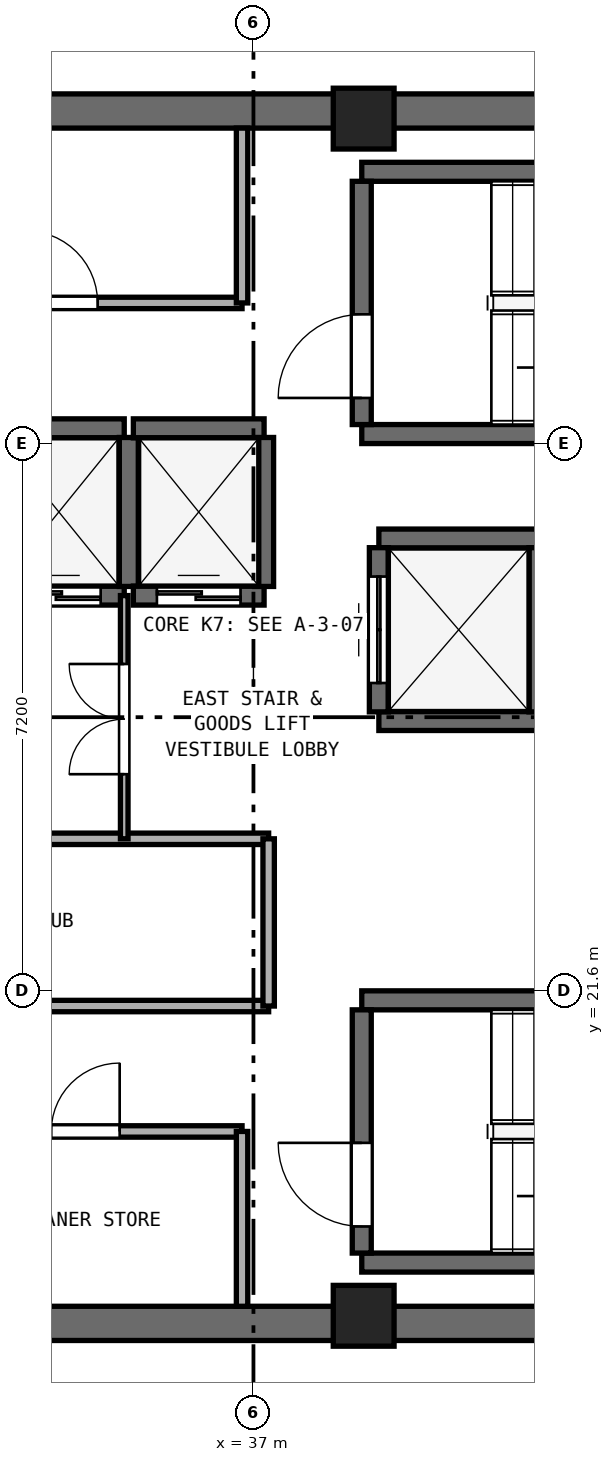
"""IFC4 building model, lengths in metres.
Left out: names, types, materials, properties, quantities, classifications, styles, units other than length and angle.
Written with IfcOpenShell. Run it as: python <this file> out.ifc"""

import sys

from ifc_helpers import new_model, si_unit, direction, frame, frame_2d, origin, origin_2d, place, context, subcontext, project, spatial, rectangle, extrude, element, fill, save


model = new_model("IFC4")
c1 = context("Model", 3, precision=1e-05, world=origin(), true_north=direction((0.0, 1.0)))
c2 = subcontext(c1, "Body", "Model", "MODEL_VIEW")
j1 = project(units=[si_unit("LENGTHUNIT", "METRE"), si_unit("PLANEANGLEUNIT", "RADIAN")], contexts=[c1])
p1 = place(None, origin())
s1 = spatial("IfcSite", under=j1, at=p1, CompositionType="ELEMENT")
p2 = place(p1, origin())
s2 = spatial("IfcBuilding", under=s1, at=p2, CompositionType="ELEMENT")
p3 = place(p2, frame((0.0, 0.0, 255.4)))
s3 = spatial("IfcBuildingStorey", under=s2, at=p3, CompositionType="ELEMENT", Elevation=255.4)
for number, where, z_axis, x_axis in (
    (1, (25.4, 17.225, 0.0), (0.0, 0.0, 1.0), (1.0, 0.0, 0.0)),
    (2, (25.4, 33.175, 0.0), (0.0, 0.0, 1.0), (1.0, 0.0, 0.0)),
):
    element("IfcWall", number, at=place(p3, frame(where, z_axis=z_axis, x_axis=x_axis)), inside=s3, PredefinedType="SHEAR", context=c2, shape_type="SweptSolid", body=[
        extrude(rectangle(XDim=23.2, YDim=0.45, at=frame_2d((11.6, 0.0))), origin(), (0.0, 0.0, 1.0), 3.51),
    ])
for number, where, z_axis, x_axis in (
    (3, (38.45, 17.325, 0.0), (0.0, 0.0, 1.0), (1.0, 0.0, 0.0)),
    (4, (38.45, 33.075, 0.0), (0.0, 0.0, 1.0), (1.0, 0.0, 0.0)),
):
    element("IfcColumn", number, at=place(p3, frame(where, z_axis=z_axis, x_axis=x_axis)), inside=s3, PredefinedType="PILASTER", context=c2, shape_type="SweptSolid", body=[
        extrude(rectangle(XDim=0.8, YDim=0.8, at=origin_2d()), origin(), (0.0, 0.0, 1.0), 3.8),
    ])
for number, where, z_axis, x_axis in (
    (5, (38.425, 28.925, 0.0), (0.0, 0.0, 1.0), (1.0, 0.0, 0.0)),
    (6, (38.425, 32.375, 0.0), (0.0, 0.0, 1.0), (1.0, 0.0, 0.0)),
):
    element("IfcWall", number, at=place(p3, frame(where, z_axis=z_axis, x_axis=x_axis)), inside=s3, PredefinedType="SHEAR", context=c2, shape_type="SweptSolid", body=[
        extrude(rectangle(XDim=7.3, YDim=0.25, at=frame_2d((3.65, 0.0))), origin(), (0.0, 0.0, 1.0), 3.51),
    ])
p4 = place(p3, frame((38.425, 29.05, 0.0), z_axis=(0.0, 0.0, 1.0), x_axis=(0.0, 1.0, 0.0)))
e7 = element("IfcWall", 7, at=p4, inside=s3, PredefinedType="SHEAR", context=c2, shape_type="SweptSolid", body=[
    extrude(rectangle(XDim=3.2, YDim=0.25, at=frame_2d((1.6, 0.0))), origin(), (0.0, 0.0, 1.0), 3.51),
])
p5 = place(p4, frame((0.35, 0.0, 0.0)))
e8 = element("IfcOpeningElement", 8, at=p5, cuts=e7, PredefinedType="OPENING", context=c2, shape_type="SweptSolid", body=[
    extrude(rectangle(XDim=1.1, YDim=2.15, at=frame_2d((0.55, 1.075))), frame((0.0, 0.135, 0.0), z_axis=(0.0, -1.0, 0.0), x_axis=(1.0, 0.0, 0.0)), (0.0, 0.0, 1.0), 0.27),
])
for number, where, z_axis, x_axis in (
    (9, (38.425, 18.025, 0.0), (0.0, 0.0, 1.0), (1.0, 0.0, 0.0)),
    (10, (38.425, 21.475, 0.0), (0.0, 0.0, 1.0), (1.0, 0.0, 0.0)),
):
    element("IfcWall", number, at=place(p3, frame(where, z_axis=z_axis, x_axis=x_axis)), inside=s3, PredefinedType="SHEAR", context=c2, shape_type="SweptSolid", body=[
        extrude(rectangle(XDim=7.3, YDim=0.25, at=frame_2d((3.65, 0.0))), origin(), (0.0, 0.0, 1.0), 3.51),
    ])
p6 = place(p3, frame((38.425, 18.15, 0.0), z_axis=(0.0, 0.0, 1.0), x_axis=(0.0, 1.0, 0.0)))
e11 = element("IfcWall", 11, at=p6, inside=s3, PredefinedType="SHEAR", context=c2, shape_type="SweptSolid", body=[
    extrude(rectangle(XDim=3.2, YDim=0.25, at=frame_2d((1.6, 0.0))), origin(), (0.0, 0.0, 1.0), 3.51),
])
p7 = place(p6, frame((0.35, 0.0, 0.0)))
e12 = element("IfcOpeningElement", 12, at=p7, cuts=e11, PredefinedType="OPENING", context=c2, shape_type="SweptSolid", body=[
    extrude(rectangle(XDim=1.1, YDim=2.15, at=frame_2d((0.55, 1.075))), frame((0.0, 0.135, 0.0), z_axis=(0.0, -1.0, 0.0), x_axis=(1.0, 0.0, 0.0)), (0.0, 0.0, 1.0), 0.27),
])
p8 = place(p3, frame((33.58, 26.8, 0.0), z_axis=(0.0, 0.0, 1.0), x_axis=(1.0, 0.0, 0.0)))
e13 = element("IfcWall", 13, at=p8, inside=s3, PredefinedType="SHEAR", context=c2, shape_type="SweptSolid", body=[
    extrude(rectangle(XDim=1.72, YDim=0.25, at=frame_2d((0.86, 0.0))), origin(), (0.0, 0.0, 1.0), 3.51),
])
p9 = place(p8, frame((0.31, 0.0, 0.0)))
e14 = element("IfcOpeningElement", 14, at=p9, cuts=e13, PredefinedType="OPENING", context=c2, shape_type="SweptSolid", body=[
    extrude(rectangle(XDim=1.1, YDim=2.15, at=frame_2d((0.55, 1.075))), frame((0.0, 0.135, 0.0), z_axis=(0.0, -1.0, 0.0), x_axis=(1.0, 0.0, 0.0)), (0.0, 0.0, 1.0), 0.27),
])
p10 = place(p3, frame((33.58, 29.0, 0.0), z_axis=(0.0, 0.0, 1.0), x_axis=(1.0, 0.0, 0.0)))
e15 = element("IfcWall", 15, at=p10, inside=s3, PredefinedType="SHEAR", context=c2, shape_type="SweptSolid", body=[
    extrude(rectangle(XDim=1.72, YDim=0.25, at=frame_2d((0.86, 0.0))), origin(), (0.0, 0.0, 1.0), 3.51),
])
p11 = place(p3, frame((35.36, 26.92, 0.0), z_axis=(0.0, 0.0, 1.0), x_axis=(0.0, 1.0, 0.0)))
e16 = element("IfcWall", 16, at=p11, inside=s3, PredefinedType="SHEAR", context=c2, shape_type="SweptSolid", body=[
    extrude(rectangle(XDim=1.96, YDim=0.25, at=frame_2d((0.98, 0.0))), origin(), (0.0, 0.0, 1.0), 3.51),
])
p12 = place(p3, frame((35.42, 26.8, 0.0), z_axis=(0.0, 0.0, 1.0), x_axis=(1.0, 0.0, 0.0)))
e17 = element("IfcWall", 17, at=p12, inside=s3, PredefinedType="SHEAR", context=c2, shape_type="SweptSolid", body=[
    extrude(rectangle(XDim=1.72, YDim=0.25, at=frame_2d((0.86, 0.0))), origin(), (0.0, 0.0, 1.0), 3.51),
])
p13 = place(p12, frame((0.31, 0.0, 0.0)))
e18 = element("IfcOpeningElement", 18, at=p13, cuts=e17, PredefinedType="OPENING", context=c2, shape_type="SweptSolid", body=[
    extrude(rectangle(XDim=1.1, YDim=2.15, at=frame_2d((0.55, 1.075))), frame((0.0, 0.135, 0.0), z_axis=(0.0, -1.0, 0.0), x_axis=(1.0, 0.0, 0.0)), (0.0, 0.0, 1.0), 0.27),
])
p14 = place(p3, frame((35.42, 29.0, 0.0), z_axis=(0.0, 0.0, 1.0), x_axis=(1.0, 0.0, 0.0)))
e19 = element("IfcWall", 19, at=p14, inside=s3, PredefinedType="SHEAR", context=c2, shape_type="SweptSolid", body=[
    extrude(rectangle(XDim=1.72, YDim=0.25, at=frame_2d((0.86, 0.0))), origin(), (0.0, 0.0, 1.0), 3.51),
])
p15 = place(p3, frame((37.14, 26.92, 0.0), z_axis=(0.0, 0.0, 1.0), x_axis=(0.0, 1.0, 0.0)))
e20 = element("IfcWall", 20, at=p15, inside=s3, PredefinedType="SHEAR", context=c2, shape_type="SweptSolid", body=[
    extrude(rectangle(XDim=1.96, YDim=0.25, at=frame_2d((0.98, 0.0))), origin(), (0.0, 0.0, 1.0), 3.51),
])
for number, where, z_axis, x_axis in (
    (21, (38.65, 25.15, 0.0), (0.0, 0.0, 1.0), (1.0, 0.0, 0.0)),
    (22, (38.65, 27.55, 0.0), (0.0, 0.0, 1.0), (1.0, 0.0, 0.0)),
):
    element("IfcWall", number, at=place(p3, frame(where, z_axis=z_axis, x_axis=x_axis)), inside=s3, PredefinedType="SHEAR", context=c2, shape_type="SweptSolid", body=[
        extrude(rectangle(XDim=2.1, YDim=0.25, at=frame_2d((1.05, 0.0))), origin(), (0.0, 0.0, 1.0), 3.51),
    ])
p16 = place(p3, frame((38.65, 25.27, 0.0), z_axis=(0.0, 0.0, 1.0), x_axis=(0.0, 1.0, 0.0)))
e23 = element("IfcWall", 23, at=p16, inside=s3, PredefinedType="SHEAR", context=c2, shape_type="SweptSolid", body=[
    extrude(rectangle(XDim=2.16, YDim=0.25, at=frame_2d((1.08, 0.0))), origin(), (0.0, 0.0, 1.0), 3.51),
])
p17 = place(p16, frame((0.38, 0.0, 0.0)))
e24 = element("IfcOpeningElement", 24, at=p17, cuts=e23, PredefinedType="OPENING", context=c2, shape_type="SweptSolid", body=[
    extrude(rectangle(XDim=1.4, YDim=2.2, at=frame_2d((0.7, 1.1))), frame((0.0, 0.135, 0.0), z_axis=(0.0, -1.0, 0.0), x_axis=(1.0, 0.0, 0.0)), (0.0, 0.0, 1.0), 0.27),
])
p18 = place(p3, frame((40.75, 25.27, 0.0), z_axis=(0.0, 0.0, 1.0), x_axis=(0.0, 1.0, 0.0)))
e25 = element("IfcWall", 25, at=p18, inside=s3, PredefinedType="SHEAR", context=c2, shape_type="SweptSolid", body=[
    extrude(rectangle(XDim=2.16, YDim=0.25, at=frame_2d((1.08, 0.0))), origin(), (0.0, 0.0, 1.0), 3.51),
])
p19 = place(p3, frame((32.1, 30.65, 0.0), z_axis=(0.0, 0.0, 1.0), x_axis=(1.0, 0.0, 0.0)))
e26 = element("IfcWall", 26, at=p19, inside=s3, PredefinedType="PARTITIONING", context=c2, shape_type="SweptSolid", body=[
    extrude(rectangle(XDim=4.75, YDim=0.15, at=frame_2d((2.375, 0.0))), origin(), (0.0, 0.0, 1.0), 3.51),
])
p20 = place(p19, frame((1.9, 0.0, 0.0)))
e27 = element("IfcOpeningElement", 27, at=p20, cuts=e26, PredefinedType="OPENING", context=c2, shape_type="SweptSolid", body=[
    extrude(rectangle(XDim=0.95, YDim=2.1, at=frame_2d((0.475, 1.05))), frame((0.0, 0.085, 0.0), z_axis=(0.0, -1.0, 0.0), x_axis=(1.0, 0.0, 0.0)), (0.0, 0.0, 1.0), 0.17),
])
p21 = place(p3, frame((36.85, 30.65, 0.0), z_axis=(0.0, 0.0, 1.0), x_axis=(0.0, 1.0, 0.0)))
e28 = element("IfcWall", 28, at=p21, inside=s3, PredefinedType="PARTITIONING", context=c2, shape_type="SweptSolid", body=[
    extrude(rectangle(XDim=2.3, YDim=0.15, at=frame_2d((1.15, 0.0))), origin(), (0.0, 0.0, 1.0), 3.51),
])
p22 = place(p3, frame((32.73, 19.75, 0.0), z_axis=(0.0, 0.0, 1.0), x_axis=(1.0, 0.0, 0.0)))
e29 = element("IfcWall", 29, at=p22, inside=s3, PredefinedType="PARTITIONING", context=c2, shape_type="SweptSolid", body=[
    extrude(rectangle(XDim=4.12, YDim=0.15, at=frame_2d((2.06, 0.0))), origin(), (0.0, 0.0, 1.0), 3.51),
])
p23 = place(p22, frame((1.61, 0.0, 0.0)))
e30 = element("IfcOpeningElement", 30, at=p23, cuts=e29, PredefinedType="OPENING", context=c2, shape_type="SweptSolid", body=[
    extrude(rectangle(XDim=0.9, YDim=2.1, at=frame_2d((0.45, 1.05))), frame((0.0, 0.085, 0.0), z_axis=(0.0, -1.0, 0.0), x_axis=(1.0, 0.0, 0.0)), (0.0, 0.0, 1.0), 0.17),
])
p24 = place(p3, frame((36.85, 17.45, 0.0), z_axis=(0.0, 0.0, 1.0), x_axis=(0.0, 1.0, 0.0)))
e31 = element("IfcWall", 31, at=p24, inside=s3, PredefinedType="PARTITIONING", context=c2, shape_type="SweptSolid", body=[
    extrude(rectangle(XDim=2.3, YDim=0.15, at=frame_2d((1.15, 0.0))), origin(), (0.0, 0.0, 1.0), 3.51),
])
p25 = place(p3, frame((30.08, 21.4, 0.0), z_axis=(0.0, 0.0, 1.0), x_axis=(1.0, 0.0, 0.0)))
e32 = element("IfcWall", 32, at=p25, inside=s3, PredefinedType="PARTITIONING", context=c2, shape_type="SweptSolid", body=[
    extrude(rectangle(XDim=7.12, YDim=0.15, at=frame_2d((3.56, 0.0))), origin(), (0.0, 0.0, 1.0), 3.51),
])
p26 = place(p3, frame((30.08, 23.6, 0.0), z_axis=(0.0, 0.0, 1.0), x_axis=(1.0, 0.0, 0.0)))
e33 = element("IfcWall", 33, at=p26, inside=s3, PredefinedType="PARTITIONING", context=c2, shape_type="SweptSolid", body=[
    extrude(rectangle(XDim=7.12, YDim=0.15, at=frame_2d((3.56, 0.0))), origin(), (0.0, 0.0, 1.0), 3.51),
])
p27 = place(p26, frame((3.11, 0.0, 0.0)))
e34 = element("IfcOpeningElement", 34, at=p27, cuts=e33, PredefinedType="OPENING", context=c2, shape_type="SweptSolid", body=[
    extrude(rectangle(XDim=0.9, YDim=2.1, at=frame_2d((0.45, 1.05))), frame((0.0, 0.085, 0.0), z_axis=(0.0, -1.0, 0.0), x_axis=(1.0, 0.0, 0.0)), (0.0, 0.0, 1.0), 0.17),
])
p28 = place(p3, frame((37.2, 21.4, 0.0), z_axis=(0.0, 0.0, 1.0), x_axis=(0.0, 1.0, 0.0)))
e35 = element("IfcWall", 35, at=p28, inside=s3, PredefinedType="PARTITIONING", context=c2, shape_type="SweptSolid", body=[
    extrude(rectangle(XDim=2.2, YDim=0.15, at=frame_2d((1.1, 0.0))), origin(), (0.0, 0.0, 1.0), 3.51),
])
p29 = place(p3, frame((35.3, 23.6, 0.0), z_axis=(0.0, 0.0, 1.0), x_axis=(0.0, 1.0, 0.0)))
e36 = element("IfcWall", 36, at=p29, inside=s3, PredefinedType="PARTITIONING", context=c2, shape_type="SweptSolid", body=[
    extrude(rectangle(XDim=3.2, YDim=0.1, at=frame_2d((1.6, 0.0))), origin(), (0.0, 0.0, 1.0), 3.51),
])
p30 = place(p29, frame((0.85, 0.0, 0.0)))
e37 = element("IfcOpeningElement", 37, at=p30, cuts=e36, PredefinedType="OPENING", context=c2, shape_type="SweptSolid", body=[
    extrude(rectangle(XDim=1.45, YDim=2.12, at=frame_2d((0.725, 1.06))), frame((0.0, 0.06, 0.0), z_axis=(0.0, -1.0, 0.0), x_axis=(1.0, 0.0, 0.0)), (0.0, 0.0, 1.0), 0.12),
])
p31 = place(p5, origin())
e38 = element("IfcDoor", 38, at=p31, inside=s3, OperationType="SINGLE_SWING_LEFT", PredefinedType="DOOR", context=c2, shape_type="SweptSolid", body=[
    extrude(rectangle(XDim=1.1, YDim=2.15, at=frame_2d((0.55, 1.075))), frame((0.0, 0.025, 0.0), z_axis=(0.0, -1.0, 0.0), x_axis=(1.0, 0.0, 0.0)), (0.0, 0.0, 1.0), 0.05),
])
fill(e8, e38)
p32 = place(p7, origin())
e39 = element("IfcDoor", 39, at=p32, inside=s3, OperationType="SINGLE_SWING_RIGHT", PredefinedType="DOOR", context=c2, shape_type="SweptSolid", body=[
    extrude(rectangle(XDim=1.1, YDim=2.15, at=frame_2d((0.55, 1.075))), frame((0.0, 0.025, 0.0), z_axis=(0.0, -1.0, 0.0), x_axis=(1.0, 0.0, 0.0)), (0.0, 0.0, 1.0), 0.05),
])
fill(e12, e39)
p33 = place(p9, origin())
e40 = element("IfcDoor", 40, at=p33, inside=s3, OperationType="DOUBLE_DOOR_SLIDING", PredefinedType="DOOR", context=c2, shape_type="SweptSolid", body=[
    extrude(rectangle(XDim=1.1, YDim=2.15, at=frame_2d((0.55, 1.075))), frame((0.0, 0.025, 0.0), z_axis=(0.0, -1.0, 0.0), x_axis=(1.0, 0.0, 0.0)), (0.0, 0.0, 1.0), 0.05),
])
fill(e14, e40)
p34 = place(p13, origin())
e41 = element("IfcDoor", 41, at=p34, inside=s3, OperationType="DOUBLE_DOOR_SLIDING", PredefinedType="DOOR", context=c2, shape_type="SweptSolid", body=[
    extrude(rectangle(XDim=1.1, YDim=2.15, at=frame_2d((0.55, 1.075))), frame((0.0, 0.025, 0.0), z_axis=(0.0, -1.0, 0.0), x_axis=(1.0, 0.0, 0.0)), (0.0, 0.0, 1.0), 0.05),
])
fill(e18, e41)
p35 = place(p17, origin())
e42 = element("IfcDoor", 42, at=p35, inside=s3, OperationType="DOUBLE_DOOR_SLIDING", PredefinedType="DOOR", context=c2, shape_type="SweptSolid", body=[
    extrude(rectangle(XDim=1.4, YDim=2.2, at=frame_2d((0.7, 1.1))), frame((0.0, 0.025, 0.0), z_axis=(0.0, -1.0, 0.0), x_axis=(1.0, 0.0, 0.0)), (0.0, 0.0, 1.0), 0.05),
])
fill(e24, e42)
p36 = place(p20, origin())
e43 = element("IfcDoor", 43, at=p36, inside=s3, OperationType="SINGLE_SWING_LEFT", PredefinedType="DOOR", context=c2, shape_type="SweptSolid", body=[
    extrude(rectangle(XDim=0.95, YDim=2.1, at=frame_2d((0.475, 1.05))), frame((0.0, 0.025, 0.0), z_axis=(0.0, -1.0, 0.0), x_axis=(1.0, 0.0, 0.0)), (0.0, 0.0, 1.0), 0.05),
])
fill(e27, e43)
p37 = place(p23, origin())
e44 = element("IfcDoor", 44, at=p37, inside=s3, OperationType="SINGLE_SWING_RIGHT", PredefinedType="DOOR", context=c2, shape_type="SweptSolid", body=[
    extrude(rectangle(XDim=0.9, YDim=2.1, at=frame_2d((0.45, 1.05))), frame((0.0, 0.025, 0.0), z_axis=(0.0, -1.0, 0.0), x_axis=(1.0, 0.0, 0.0)), (0.0, 0.0, 1.0), 0.05),
])
fill(e30, e44)
p38 = place(p30, origin())
e45 = element("IfcDoor", 45, at=p38, inside=s3, OperationType="DOUBLE_DOOR_SINGLE_SWING", PredefinedType="DOOR", context=c2, shape_type="SweptSolid", body=[
    extrude(rectangle(XDim=1.45, YDim=2.12, at=frame_2d((0.725, 1.06))), frame((0.0, 0.025, 0.0), z_axis=(0.0, -1.0, 0.0), x_axis=(1.0, 0.0, 0.0)), (0.0, 0.0, 1.0), 0.05),
])
fill(e37, e45)
save(model, sys.argv[1])
